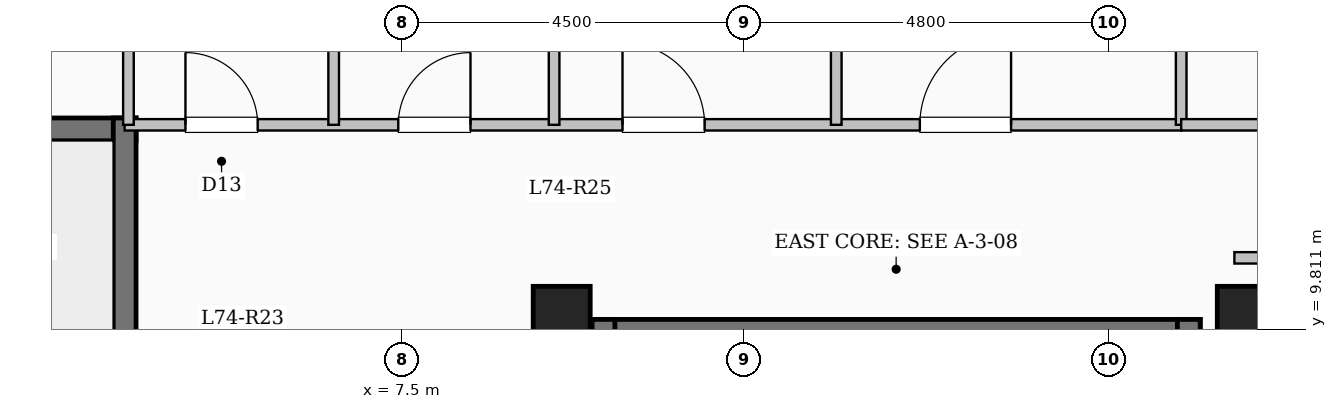
"""IFC4 building model, lengths in metres.
Left out: names, types, materials, properties, quantities, classifications, styles, units other than length and angle.
Written with IfcOpenShell. Run it as: python <this file> out.ifc"""

import sys

from ifc_helpers import new_model, si_unit, direction, frame, frame_2d, origin, origin_2d, place, context, subcontext, project, spatial, rectangle, extrude, element, fill, save


model = new_model("IFC4")
c1 = context("Model", 3, precision=1e-05, world=origin(), true_north=direction((0.0, 1.0)))
c2 = subcontext(c1, "Body", "Model", "MODEL_VIEW")
j1 = project(units=[si_unit("LENGTHUNIT", "METRE"), si_unit("PLANEANGLEUNIT", "RADIAN")], contexts=[c1])
p1 = place(None, origin())
s1 = spatial("IfcSite", under=j1, at=p1, CompositionType="ELEMENT")
p2 = place(p1, origin())
s2 = spatial("IfcBuilding", under=s1, at=p2, CompositionType="ELEMENT")
p3 = place(p2, frame((0.0, 0.0, 271.65)))
s3 = spatial("IfcBuildingStorey", under=s2, at=p3, CompositionType="ELEMENT", Elevation=271.65)
for number, where, z_axis, x_axis in (
    (1, (9.6, 10.0, 0.0), (0.0, 0.0, 1.0), (1.0, 0.0, 0.0)),
    (2, (18.6, 10.0, 0.0), (0.0, 0.0, 1.0), (1.0, 0.0, 0.0)),
):
    element("IfcColumn", number, at=place(p3, frame(where, z_axis=z_axis, x_axis=x_axis)), inside=s3, PredefinedType="COLUMN", context=c2, shape_type="SweptSolid", body=[
        extrude(rectangle(XDim=0.75, YDim=0.75, at=origin_2d()), origin(), (0.0, 0.0, 1.0), 4.65),
    ])
p4 = place(p3, frame((10.0, 9.79, 0.0), z_axis=(0.0, 0.0, 1.0), x_axis=(1.0, 0.0, 0.0)))
e3 = element("IfcWall", 3, at=p4, inside=s3, PredefinedType="SHEAR", context=c2, shape_type="SweptSolid", body=[
    extrude(rectangle(XDim=8.0, YDim=0.3, at=frame_2d((4.0, 0.0))), origin(), (0.0, 0.0, 1.0), 4.65),
])
for number, where, z_axis, x_axis in (
    (4, (10.15, 6.35, 0.0), (0.0, 0.0, 1.0), (0.0, 1.0, 0.0)),
    (5, (17.85, 6.35, 0.0), (0.0, 0.0, 1.0), (0.0, 1.0, 0.0)),
):
    element("IfcWall", number, at=place(p3, frame(where, z_axis=z_axis, x_axis=x_axis)), inside=s3, PredefinedType="SHEAR", context=c2, shape_type="SweptSolid", body=[
        extrude(rectangle(XDim=3.59, YDim=0.3, at=frame_2d((1.795, 0.0))), origin(), (0.0, 0.0, 1.0), 4.65),
    ])
p5 = place(p3, frame((-4.0, 12.44, 0.0), z_axis=(0.0, 0.0, 1.0), x_axis=(1.0, 0.0, 0.0)))
e6 = element("IfcWall", 6, at=p5, inside=s3, PredefinedType="SHEAR", context=c2, shape_type="SweptSolid", body=[
    extrude(rectangle(XDim=8.0, YDim=0.3, at=frame_2d((4.0, 0.0))), origin(), (0.0, 0.0, 1.0), 4.65),
])
p6 = place(p3, frame((3.85, 9.0, 0.0), z_axis=(0.0, 0.0, 1.0), x_axis=(0.0, 1.0, 0.0)))
e7 = element("IfcWall", 7, at=p6, inside=s3, PredefinedType="SHEAR", context=c2, shape_type="SweptSolid", body=[
    extrude(rectangle(XDim=3.59, YDim=0.3, at=frame_2d((1.795, 0.0))), origin(), (0.0, 0.0, 1.0), 4.65),
])
p7 = place(p3, frame((3.85, 12.5, 0.0), z_axis=(0.0, 0.0, 1.0), x_axis=(1.0, 0.0, 0.0)))
e8 = element("IfcWall", 8, at=p7, inside=s3, PredefinedType="PARTITIONING", context=c2, shape_type="SweptSolid", body=[
    extrude(rectangle(XDim=13.9, YDim=0.15, at=frame_2d((6.95, 0.0))), origin(), (0.0, 0.0, 1.0), 4.35),
])
p8 = place(p7, frame((0.8, 0.0, 0.0)))
e9 = element("IfcOpeningElement", 9, at=p8, cuts=e8, PredefinedType="OPENING", context=c2, shape_type="SweptSolid", body=[
    extrude(rectangle(XDim=0.95, YDim=2.15, at=frame_2d((0.475, 1.075))), frame((0.0, 0.085, 0.0), z_axis=(0.0, -1.0, 0.0), x_axis=(1.0, 0.0, 0.0)), (0.0, 0.0, 1.0), 0.17),
])
p9 = place(p7, frame((3.6, 0.0, 0.0)))
e10 = element("IfcOpeningElement", 10, at=p9, cuts=e8, PredefinedType="OPENING", context=c2, shape_type="SweptSolid", body=[
    extrude(rectangle(XDim=0.95, YDim=2.15, at=frame_2d((0.475, 1.075))), frame((0.0, 0.085, 0.0), z_axis=(0.0, -1.0, 0.0), x_axis=(1.0, 0.0, 0.0)), (0.0, 0.0, 1.0), 0.17),
])
p10 = place(p7, frame((6.55, 0.0, 0.0)))
e11 = element("IfcOpeningElement", 11, at=p10, cuts=e8, PredefinedType="OPENING", context=c2, shape_type="SweptSolid", body=[
    extrude(rectangle(XDim=1.08, YDim=2.15, at=frame_2d((0.54, 1.075))), frame((0.0, 0.085, 0.0), z_axis=(0.0, -1.0, 0.0), x_axis=(1.0, 0.0, 0.0)), (0.0, 0.0, 1.0), 0.17),
])
p11 = place(p7, frame((10.462, 0.0, 0.0)))
e12 = element("IfcOpeningElement", 12, at=p11, cuts=e8, PredefinedType="OPENING", context=c2, shape_type="SweptSolid", body=[
    extrude(rectangle(XDim=1.2, YDim=2.15, at=frame_2d((0.6, 1.075))), frame((0.0, 0.085, 0.0), z_axis=(0.0, -1.0, 0.0), x_axis=(1.0, 0.0, 0.0)), (0.0, 0.0, 1.0), 0.17),
])
p12 = place(p3, frame((3.9, 12.5, 0.0), z_axis=(0.0, 0.0, 1.0), x_axis=(0.0, 1.0, 0.0)))
e13 = element("IfcWall", 13, at=p12, inside=s3, PredefinedType="PARTITIONING", context=c2, shape_type="SweptSolid", body=[
    extrude(rectangle(XDim=9.88, YDim=0.14, at=frame_2d((4.94, 0.0))), origin(), (0.0, 0.0, 1.0), 4.35),
])
p13 = place(p3, frame((6.6, 12.5, 0.0), z_axis=(0.0, 0.0, 1.0), x_axis=(0.0, 1.0, 0.0)))
e14 = element("IfcWall", 14, at=p13, inside=s3, PredefinedType="PARTITIONING", context=c2, shape_type="SweptSolid", body=[
    extrude(rectangle(XDim=9.485, YDim=0.14, at=frame_2d((4.743, 0.0))), origin(), (0.0, 0.0, 1.0), 4.35),
])
p14 = place(p3, frame((9.5, 12.5, 0.0), z_axis=(0.0, 0.0, 1.0), x_axis=(0.0, 1.0, 0.0)))
e15 = element("IfcWall", 15, at=p14, inside=s3, PredefinedType="PARTITIONING", context=c2, shape_type="SweptSolid", body=[
    extrude(rectangle(XDim=8.77, YDim=0.14, at=frame_2d((4.385, 0.0))), origin(), (0.0, 0.0, 1.0), 4.35),
])
p15 = place(p3, frame((13.212, 12.5, 0.0), z_axis=(0.0, 0.0, 1.0), x_axis=(0.0, 1.0, 0.0)))
e16 = element("IfcWall", 16, at=p15, inside=s3, PredefinedType="PARTITIONING", context=c2, shape_type="SweptSolid", body=[
    extrude(rectangle(XDim=8.4, YDim=0.14, at=frame_2d((4.2, 0.0))), origin(), (0.0, 0.0, 1.0), 4.35),
])
p16 = place(p3, frame((18.45, 10.75, 0.0), z_axis=(0.0, 0.0, 1.0), x_axis=(1.0, 0.0, 0.0)))
e17 = element("IfcWall", 17, at=p16, inside=s3, PredefinedType="PARTITIONING", context=c2, shape_type="SweptSolid", body=[
    extrude(rectangle(XDim=4.23, YDim=0.15, at=frame_2d((2.115, 0.0))), origin(), (0.0, 0.0, 1.0), 4.35),
])
p17 = place(p3, frame((17.75, 12.5, 0.0), z_axis=(0.0, 0.0, 1.0), x_axis=(0.0, 1.0, 0.0)))
e18 = element("IfcWall", 18, at=p17, inside=s3, PredefinedType="PARTITIONING", context=c2, shape_type="SweptSolid", body=[
    extrude(rectangle(XDim=5.05, YDim=0.14, at=frame_2d((2.525, 0.0))), origin(), (0.0, 0.0, 1.0), 4.35),
])
p18 = place(p3, frame((17.75, 12.5, 0.0), z_axis=(0.0, 0.0, 1.0), x_axis=(1.0, 0.0, 0.0)))
e19 = element("IfcWall", 19, at=p18, inside=s3, PredefinedType="PARTITIONING", context=c2, shape_type="SweptSolid", body=[
    extrude(rectangle(XDim=4.93, YDim=0.15, at=frame_2d((2.465, 0.0))), origin(), (0.0, 0.0, 1.0), 4.35),
])
p19 = place(p18, frame((1.99, 0.0, 0.0)))
e20 = element("IfcOpeningElement", 20, at=p19, cuts=e19, PredefinedType="OPENING", context=c2, shape_type="SweptSolid", body=[
    extrude(rectangle(XDim=0.95, YDim=2.15, at=frame_2d((0.475, 1.075))), frame((0.0, 0.085, 0.0), z_axis=(0.0, -1.0, 0.0), x_axis=(1.0, 0.0, 0.0)), (0.0, 0.0, 1.0), 0.17),
])
p20 = place(p8, origin())
e21 = element("IfcDoor", 21, at=p20, inside=s3, OperationType="SINGLE_SWING_LEFT", PredefinedType="DOOR", context=c2, shape_type="SweptSolid", body=[
    extrude(rectangle(XDim=0.95, YDim=2.15, at=frame_2d((0.475, 1.075))), frame((0.0, 0.025, 0.0), z_axis=(0.0, -1.0, 0.0), x_axis=(1.0, 0.0, 0.0)), (0.0, 0.0, 1.0), 0.05),
])
fill(e9, e21)
p21 = place(p9, origin())
e22 = element("IfcDoor", 22, at=p21, inside=s3, OperationType="SINGLE_SWING_RIGHT", PredefinedType="DOOR", context=c2, shape_type="SweptSolid", body=[
    extrude(rectangle(XDim=0.95, YDim=2.15, at=frame_2d((0.475, 1.075))), frame((0.0, 0.025, 0.0), z_axis=(0.0, -1.0, 0.0), x_axis=(1.0, 0.0, 0.0)), (0.0, 0.0, 1.0), 0.05),
])
fill(e10, e22)
p22 = place(p10, origin())
e23 = element("IfcDoor", 23, at=p22, inside=s3, OperationType="SINGLE_SWING_LEFT", PredefinedType="DOOR", context=c2, shape_type="SweptSolid", body=[
    extrude(rectangle(XDim=1.08, YDim=2.15, at=frame_2d((0.54, 1.075))), frame((0.0, 0.025, 0.0), z_axis=(0.0, -1.0, 0.0), x_axis=(1.0, 0.0, 0.0)), (0.0, 0.0, 1.0), 0.05),
])
fill(e11, e23)
p23 = place(p11, origin())
e24 = element("IfcDoor", 24, at=p23, inside=s3, OperationType="SINGLE_SWING_RIGHT", PredefinedType="DOOR", context=c2, shape_type="SweptSolid", body=[
    extrude(rectangle(XDim=1.2, YDim=2.15, at=frame_2d((0.6, 1.075))), frame((0.0, 0.025, 0.0), z_axis=(0.0, -1.0, 0.0), x_axis=(1.0, 0.0, 0.0)), (0.0, 0.0, 1.0), 0.05),
])
fill(e12, e24)
save(model, sys.argv[1])
